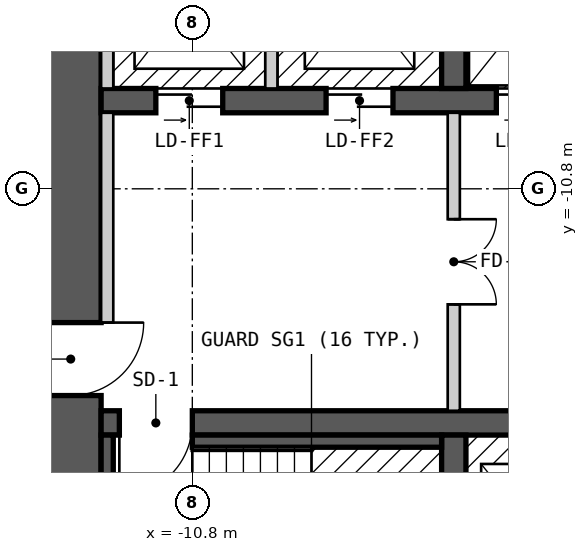
"""IFC4 building model, lengths in metres.
Left out: names, types, materials, properties, quantities, classifications, styles, units other than length and angle.
Written with IfcOpenShell. Run it as: python <this file> out.ifc"""

import sys

from ifc_helpers import new_model, si_unit, direction, frame, frame_2d, origin, place, context, subcontext, project, spatial, rectangle, extrude, element, fill, save


model = new_model("IFC4")
c1 = context("Model", 3, precision=1e-05, world=origin(), true_north=direction((0.0, 1.0)))
c2 = subcontext(c1, "Body", "Model", "MODEL_VIEW")
j1 = project(units=[si_unit("LENGTHUNIT", "METRE"), si_unit("PLANEANGLEUNIT", "RADIAN")], contexts=[c1])
p1 = place(None, origin())
s1 = spatial("IfcSite", under=j1, at=p1, CompositionType="ELEMENT")
p2 = place(p1, origin())
s2 = spatial("IfcBuilding", under=s1, at=p2, CompositionType="ELEMENT")
p3 = place(p2, frame((0.0, 0.0, 84.0)))
s3 = spatial("IfcBuildingStorey", under=s2, at=p3, CompositionType="ELEMENT", Elevation=84.0)
p4 = place(p3, frame((-12.8, -18.0, 0.0), z_axis=(0.0, 0.0, 1.0), x_axis=(0.0, 1.0, 0.0)))
e1 = element("IfcWall", 1, at=p4, inside=s3, PredefinedType="SHEAR", context=c2, shape_type="SweptSolid", body=[
    extrude(rectangle(XDim=12.0, YDim=1.0, at=frame_2d((6.0, 0.0))), origin(), (0.0, 0.0, 1.0), 2.7),
])
p5 = place(p4, frame((3.8, 0.0, 0.0)))
e2 = element("IfcOpeningElement", 2, at=p5, cuts=e1, PredefinedType="OPENING", context=c2, shape_type="SweptSolid", body=[
    extrude(rectangle(XDim=1.2, YDim=2.1, at=frame_2d((0.6, 1.05))), frame((0.0, 0.51, 0.0), z_axis=(0.0, -1.0, 0.0), x_axis=(1.0, 0.0, 0.0)), (0.0, 0.0, 1.0), 1.02),
])
p6 = place(p3, frame((-12.3, -14.65, 0.0), z_axis=(0.0, 0.0, 1.0), x_axis=(1.0, 0.0, 0.0)))
e3 = element("IfcWall", 3, at=p6, inside=s3, PredefinedType="SHEAR", context=c2, shape_type="SweptSolid", body=[
    extrude(rectangle(XDim=24.6, YDim=0.4, at=frame_2d((12.3, 0.0))), origin(), (0.0, 0.0, 1.0), 2.7),
])
p7 = place(p6, frame((1.5, 0.0, 0.0), z_axis=(0.0, 0.0, 1.0), x_axis=(-1.0, 0.0, 0.0)))
e4 = element("IfcOpeningElement", 4, at=p7, cuts=e3, PredefinedType="OPENING", context=c2, shape_type="SweptSolid", body=[
    extrude(rectangle(XDim=1.2, YDim=2.1, at=frame_2d((0.6, 1.05))), frame((0.0, 0.21, 0.0), z_axis=(0.0, -1.0, 0.0), x_axis=(1.0, 0.0, 0.0)), (0.0, 0.0, 1.0), 0.42),
])
p8 = place(p6, frame((24.35, 0.0, 0.0), z_axis=(0.0, 0.0, 1.0), x_axis=(-1.0, 0.0, 0.0)))
e5 = element("IfcOpeningElement", 5, at=p8, cuts=e3, PredefinedType="OPENING", context=c2, shape_type="SweptSolid", body=[
    extrude(rectangle(XDim=1.2, YDim=2.1, at=frame_2d((0.6, 1.05))), frame((0.0, 0.21, 0.0), z_axis=(0.0, -1.0, 0.0), x_axis=(1.0, 0.0, 0.0)), (0.0, 0.0, 1.0), 0.42),
])
p9 = place(p6, frame((16.45, 0.0, 0.0), z_axis=(0.0, 0.0, 1.0), x_axis=(-1.0, 0.0, 0.0)))
e6 = element("IfcOpeningElement", 6, at=p9, cuts=e3, PredefinedType="OPENING", context=c2, shape_type="SweptSolid", body=[
    extrude(rectangle(XDim=0.9, YDim=2.1, at=frame_2d((0.45, 1.05))), frame((0.0, 0.21, 0.0), z_axis=(0.0, -1.0, 0.0), x_axis=(1.0, 0.0, 0.0)), (0.0, 0.0, 1.0), 0.42),
])
p10 = place(p6, frame((18.25, 0.0, 0.0), z_axis=(0.0, 0.0, 1.0), x_axis=(-1.0, 0.0, 0.0)))
e7 = element("IfcOpeningElement", 7, at=p10, cuts=e3, PredefinedType="OPENING", context=c2, shape_type="SweptSolid", body=[
    extrude(rectangle(XDim=0.9, YDim=2.1, at=frame_2d((0.45, 1.05))), frame((0.0, 0.21, 0.0), z_axis=(0.0, -1.0, 0.0), x_axis=(1.0, 0.0, 0.0)), (0.0, 0.0, 1.0), 0.42),
])
p11 = place(p3, frame((-12.3, -9.35, 0.0), z_axis=(0.0, 0.0, 1.0), x_axis=(1.0, 0.0, 0.0)))
e8 = element("IfcWall", 8, at=p11, inside=s3, PredefinedType="SHEAR", context=c2, shape_type="SweptSolid", body=[
    extrude(rectangle(XDim=22.5, YDim=0.4, at=frame_2d((11.25, 0.0))), origin(), (0.0, 0.0, 1.0), 2.7),
])
p12 = place(p11, frame((0.9, 0.0, 0.0)))
e9 = element("IfcOpeningElement", 9, at=p12, cuts=e8, PredefinedType="OPENING", context=c2, shape_type="SweptSolid", body=[
    extrude(rectangle(XDim=1.1, YDim=2.1, at=frame_2d((0.55, 1.05))), frame((0.0, 0.21, 0.0), z_axis=(0.0, -1.0, 0.0), x_axis=(1.0, 0.0, 0.0)), (0.0, 0.0, 1.0), 0.42),
])
p13 = place(p11, frame((3.7, 0.0, 0.0)))
e10 = element("IfcOpeningElement", 10, at=p13, cuts=e8, PredefinedType="OPENING", context=c2, shape_type="SweptSolid", body=[
    extrude(rectangle(XDim=1.1, YDim=2.1, at=frame_2d((0.55, 1.05))), frame((0.0, 0.21, 0.0), z_axis=(0.0, -1.0, 0.0), x_axis=(1.0, 0.0, 0.0)), (0.0, 0.0, 1.0), 0.42),
])
p14 = place(p11, frame((6.5, 0.0, 0.0)))
e11 = element("IfcOpeningElement", 11, at=p14, cuts=e8, PredefinedType="OPENING", context=c2, shape_type="SweptSolid", body=[
    extrude(rectangle(XDim=1.1, YDim=2.1, at=frame_2d((0.55, 1.05))), frame((0.0, 0.21, 0.0), z_axis=(0.0, -1.0, 0.0), x_axis=(1.0, 0.0, 0.0)), (0.0, 0.0, 1.0), 0.42),
])
p15 = place(p11, frame((8.8, 0.0, 0.0)))
e12 = element("IfcOpeningElement", 12, at=p15, cuts=e8, PredefinedType="OPENING", context=c2, shape_type="SweptSolid", body=[
    extrude(rectangle(XDim=1.1, YDim=2.1, at=frame_2d((0.55, 1.05))), frame((0.0, 0.21, 0.0), z_axis=(0.0, -1.0, 0.0), x_axis=(1.0, 0.0, 0.0)), (0.0, 0.0, 1.0), 0.42),
])
p16 = place(p11, frame((11.1, 0.0, 0.0)))
e13 = element("IfcOpeningElement", 13, at=p16, cuts=e8, PredefinedType="OPENING", context=c2, shape_type="SweptSolid", body=[
    extrude(rectangle(XDim=1.1, YDim=2.1, at=frame_2d((0.55, 1.05))), frame((0.0, 0.21, 0.0), z_axis=(0.0, -1.0, 0.0), x_axis=(1.0, 0.0, 0.0)), (0.0, 0.0, 1.0), 0.42),
])
p17 = place(p11, frame((13.4, 0.0, 0.0)))
e14 = element("IfcOpeningElement", 14, at=p17, cuts=e8, PredefinedType="OPENING", context=c2, shape_type="SweptSolid", body=[
    extrude(rectangle(XDim=1.1, YDim=2.1, at=frame_2d((0.55, 1.05))), frame((0.0, 0.21, 0.0), z_axis=(0.0, -1.0, 0.0), x_axis=(1.0, 0.0, 0.0)), (0.0, 0.0, 1.0), 0.42),
])
p18 = place(p11, frame((15.7, 0.0, 0.0)))
e15 = element("IfcOpeningElement", 15, at=p18, cuts=e8, PredefinedType="OPENING", context=c2, shape_type="SweptSolid", body=[
    extrude(rectangle(XDim=1.1, YDim=2.1, at=frame_2d((0.55, 1.05))), frame((0.0, 0.21, 0.0), z_axis=(0.0, -1.0, 0.0), x_axis=(1.0, 0.0, 0.0)), (0.0, 0.0, 1.0), 0.42),
])
p19 = place(p11, frame((18.0, 0.0, 0.0)))
e16 = element("IfcOpeningElement", 16, at=p19, cuts=e8, PredefinedType="OPENING", context=c2, shape_type="SweptSolid", body=[
    extrude(rectangle(XDim=1.1, YDim=2.1, at=frame_2d((0.55, 1.05))), frame((0.0, 0.21, 0.0), z_axis=(0.0, -1.0, 0.0), x_axis=(1.0, 0.0, 0.0)), (0.0, 0.0, 1.0), 0.42),
])
p20 = place(p11, frame((20.4, 0.0, 0.0)))
e17 = element("IfcOpeningElement", 17, at=p20, cuts=e8, PredefinedType="OPENING", context=c2, shape_type="SweptSolid", body=[
    extrude(rectangle(XDim=1.1, YDim=2.1, at=frame_2d((0.55, 1.05))), frame((0.0, 0.21, 0.0), z_axis=(0.0, -1.0, 0.0), x_axis=(1.0, 0.0, 0.0)), (0.0, 0.0, 1.0), 0.42),
])
for number, where, z_axis, x_axis in (
    (18, (-6.5, -18.0, 0.0), (0.0, 0.0, 1.0), (0.0, 1.0, 0.0)),
    (19, (-6.5, -9.15, 0.0), (0.0, 0.0, 1.0), (0.0, 1.0, 0.0)),
):
    element("IfcWall", number, at=place(p3, frame(where, z_axis=z_axis, x_axis=x_axis)), inside=s3, PredefinedType="SHEAR", context=c2, shape_type="SweptSolid", body=[
        extrude(rectangle(XDim=3.15, YDim=0.4, at=frame_2d((1.575, 0.0))), origin(), (0.0, 0.0, 1.0), 2.7),
    ])
p21 = place(p3, frame((-12.2, -18.0, 0.0), z_axis=(0.0, 0.0, 1.0), x_axis=(0.0, 1.0, 0.0)))
e20 = element("IfcWall", 20, at=p21, inside=s3, PredefinedType="SOLIDWALL", context=c2, shape_type="SweptSolid", body=[
    extrude(rectangle(XDim=3.15, YDim=0.2, at=frame_2d((1.575, 0.0))), origin(), (0.0, 0.0, 1.0), 2.7),
])
p22 = place(p3, frame((-12.2, -13.0, 0.0), z_axis=(0.0, 0.0, 1.0), x_axis=(0.0, 1.0, 0.0)))
e21 = element("IfcWall", 21, at=p22, inside=s3, PredefinedType="PARTITIONING", context=c2, shape_type="SweptSolid", body=[
    extrude(rectangle(XDim=3.45, YDim=0.2, at=frame_2d((1.725, 0.0))), origin(), (0.0, 0.0, 1.0), 2.7),
])
p23 = place(p3, frame((-12.2, -9.15, 0.0), z_axis=(0.0, 0.0, 1.0), x_axis=(0.0, 1.0, 0.0)))
e22 = element("IfcWall", 22, at=p23, inside=s3, PredefinedType="SOLIDWALL", context=c2, shape_type="SweptSolid", body=[
    extrude(rectangle(XDim=3.15, YDim=0.2, at=frame_2d((1.575, 0.0))), origin(), (0.0, 0.0, 1.0), 2.7),
])
p24 = place(p3, frame((-10.8, -14.95, 0.0), z_axis=(0.0, 0.0, 1.0), x_axis=(1.0, 0.0, 0.0)))
e23 = element("IfcWall", 23, at=p24, inside=s3, PredefinedType="SOLIDWALL", context=c2, shape_type="SweptSolid", body=[
    extrude(rectangle(XDim=4.1, YDim=0.2, at=frame_2d((2.05, 0.0))), origin(), (0.0, 0.0, 1.0), 2.7),
])
p25 = place(p3, frame((-9.5, -9.15, 0.0), z_axis=(0.0, 0.0, 1.0), x_axis=(0.0, 1.0, 0.0)))
e24 = element("IfcWall", 24, at=p25, inside=s3, PredefinedType="SOLIDWALL", context=c2, shape_type="SweptSolid", body=[
    extrude(rectangle(XDim=2.95, YDim=0.2, at=frame_2d((1.475, 0.0))), origin(), (0.0, 0.0, 1.0), 2.7),
])
p26 = place(p3, frame((-6.5, -14.45, 0.0), z_axis=(0.0, 0.0, 1.0), x_axis=(0.0, 1.0, 0.0)))
e25 = element("IfcWall", 25, at=p26, inside=s3, PredefinedType="PARTITIONING", context=c2, shape_type="SweptSolid", body=[
    extrude(rectangle(XDim=4.9, YDim=0.2, at=frame_2d((2.45, 0.0))), origin(), (0.0, 0.0, 1.0), 2.7),
])
p27 = place(p26, frame((3.15, 0.0, 0.0), z_axis=(0.0, 0.0, 1.0), x_axis=(-1.0, 0.0, 0.0)))
e26 = element("IfcOpeningElement", 26, at=p27, cuts=e25, PredefinedType="OPENING", context=c2, shape_type="SweptSolid", body=[
    extrude(rectangle(XDim=1.4, YDim=2.1, at=frame_2d((0.7, 1.05))), frame((0.0, 0.11, 0.0), z_axis=(0.0, -1.0, 0.0), x_axis=(1.0, 0.0, 0.0)), (0.0, 0.0, 1.0), 0.22),
])
p28 = place(p12, origin())
e27 = element("IfcDoor", 27, at=p28, inside=s3, OperationType="DOUBLE_DOOR_SLIDING", PredefinedType="DOOR", context=c2, shape_type="SweptSolid", body=[
    extrude(rectangle(XDim=1.1, YDim=2.1, at=frame_2d((0.55, 1.05))), frame((0.0, 0.025, 0.0), z_axis=(0.0, -1.0, 0.0), x_axis=(1.0, 0.0, 0.0)), (0.0, 0.0, 1.0), 0.05),
])
fill(e9, e27)
p29 = place(p13, origin())
e28 = element("IfcDoor", 28, at=p29, inside=s3, OperationType="DOUBLE_DOOR_SLIDING", PredefinedType="DOOR", context=c2, shape_type="SweptSolid", body=[
    extrude(rectangle(XDim=1.1, YDim=2.1, at=frame_2d((0.55, 1.05))), frame((0.0, 0.025, 0.0), z_axis=(0.0, -1.0, 0.0), x_axis=(1.0, 0.0, 0.0)), (0.0, 0.0, 1.0), 0.05),
])
fill(e10, e28)
p30 = place(p14, origin())
e29 = element("IfcDoor", 29, at=p30, inside=s3, OperationType="DOUBLE_DOOR_SLIDING", PredefinedType="DOOR", context=c2, shape_type="SweptSolid", body=[
    extrude(rectangle(XDim=1.1, YDim=2.1, at=frame_2d((0.55, 1.05))), frame((0.0, 0.025, 0.0), z_axis=(0.0, -1.0, 0.0), x_axis=(1.0, 0.0, 0.0)), (0.0, 0.0, 1.0), 0.05),
])
fill(e11, e29)
p31 = place(p7, origin())
e30 = element("IfcDoor", 30, at=p31, inside=s3, OperationType="SINGLE_SWING_RIGHT", PredefinedType="DOOR", context=c2, shape_type="SweptSolid", body=[
    extrude(rectangle(XDim=1.2, YDim=2.1, at=frame_2d((0.6, 1.05))), frame((0.0, 0.025, 0.0), z_axis=(0.0, -1.0, 0.0), x_axis=(1.0, 0.0, 0.0)), (0.0, 0.0, 1.0), 0.05),
])
fill(e4, e30)
p32 = place(p5, origin())
e31 = element("IfcDoor", 31, at=p32, inside=s3, OperationType="SINGLE_SWING_RIGHT", PredefinedType="DOOR", context=c2, shape_type="SweptSolid", body=[
    extrude(rectangle(XDim=1.2, YDim=2.1, at=frame_2d((0.6, 1.05))), frame((0.0, 0.025, 0.0), z_axis=(0.0, -1.0, 0.0), x_axis=(1.0, 0.0, 0.0)), (0.0, 0.0, 1.0), 0.05),
])
fill(e2, e31)
p33 = place(p27, origin())
e32 = element("IfcDoor", 32, at=p33, inside=s3, OperationType="DOUBLE_DOOR_SINGLE_SWING", PredefinedType="DOOR", context=c2, shape_type="SweptSolid", body=[
    extrude(rectangle(XDim=1.4, YDim=2.1, at=frame_2d((0.7, 1.05))), frame((0.0, 0.025, 0.0), z_axis=(0.0, -1.0, 0.0), x_axis=(1.0, 0.0, 0.0)), (0.0, 0.0, 1.0), 0.05),
])
fill(e26, e32)
save(model, sys.argv[1])
